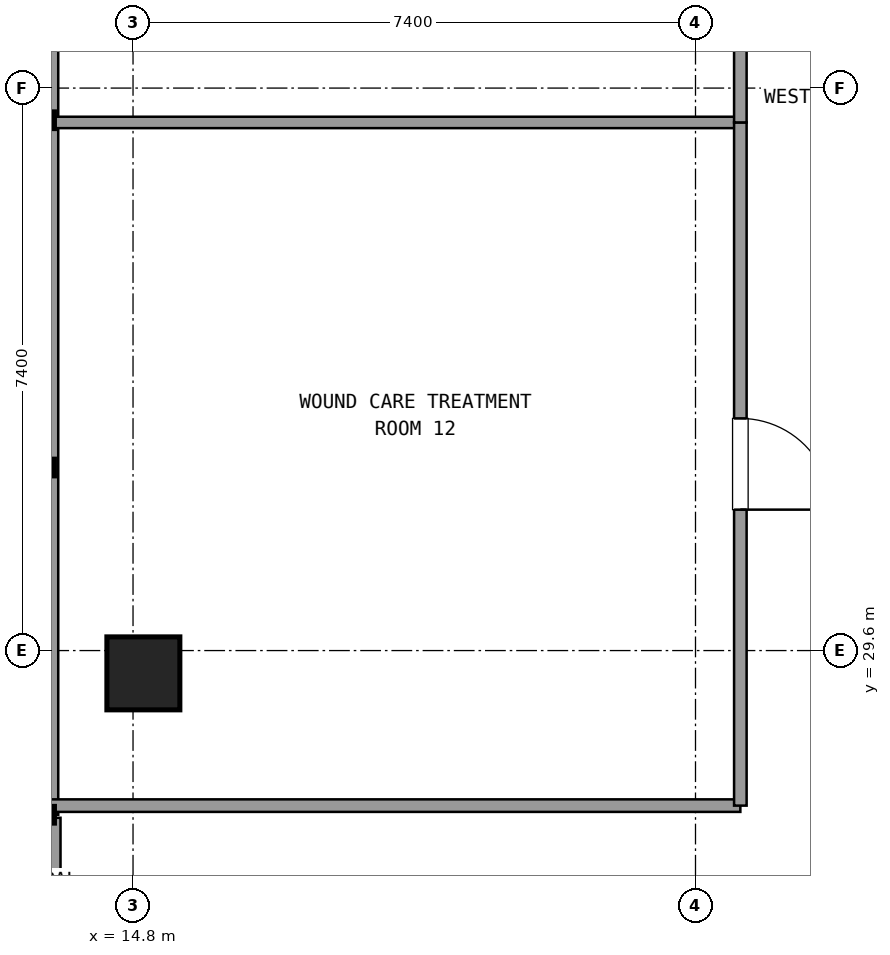
"""IFC4 building model, lengths in metres.
Left out: names, types, materials, properties, quantities, classifications, styles, units other than length and angle.
Written with IfcOpenShell. Run it as: python <this file> out.ifc"""

import sys

from ifc_helpers import new_model, si_unit, direction, frame, frame_2d, origin, origin_2d, place, context, subcontext, project, spatial, rectangle, extrude, element, fill, save


model = new_model("IFC4")
c1 = context("Model", 3, precision=1e-05, world=origin(), true_north=direction((0.0, 1.0)))
c2 = subcontext(c1, "Body", "Model", "MODEL_VIEW")
j1 = project(units=[si_unit("LENGTHUNIT", "METRE"), si_unit("PLANEANGLEUNIT", "RADIAN")], contexts=[c1])
p1 = place(None, origin())
s1 = spatial("IfcSite", under=j1, at=p1, CompositionType="ELEMENT")
p2 = place(p1, origin())
s2 = spatial("IfcBuilding", under=s1, at=p2, CompositionType="ELEMENT")
p3 = place(p2, frame((0.0, 0.0, 142.02)))
s3 = spatial("IfcBuildingStorey", under=s2, at=p3, CompositionType="ELEMENT", Elevation=142.02)
p4 = place(p3, frame((14.936, 29.3, 0.0), z_axis=(0.0, 0.0, 1.0), x_axis=(1.0, 0.0, 0.0)))
e1 = element("IfcColumn", 1, at=p4, inside=s3, PredefinedType="COLUMN", context=c2, shape_type="SweptSolid", body=[
    extrude(rectangle(XDim=0.96, YDim=0.96, at=origin_2d()), origin(), (0.0, 0.0, 1.0), 3.6),
])
p5 = place(p3, frame((13.696, 27.4, 0.0), z_axis=(0.0, 0.0, 1.0), x_axis=(0.0, -1.0, 0.0)))
e2 = element("IfcWall", 2, at=p5, inside=s3, PredefinedType="SOLIDWALL", context=c2, shape_type="SweptSolid", body=[
    extrude(rectangle(XDim=3.0, YDim=0.3, at=frame_2d((1.5, 0.0))), origin(), (0.0, 0.0, 1.0), 2.67),
])
p6 = place(p5, frame((0.9, 0.0, 0.0)))
e3 = element("IfcOpeningElement", 3, at=p6, cuts=e2, PredefinedType="OPENING", context=c2, shape_type="SweptSolid", body=[
    extrude(rectangle(XDim=1.2, YDim=2.2, at=frame_2d((0.6, 1.1))), frame((0.0, 0.16, 0.0), z_axis=(0.0, -1.0, 0.0), x_axis=(1.0, 0.0, 0.0)), (0.0, 0.0, 1.0), 0.32),
])
p7 = place(p3, frame((13.696, 41.145, 0.0), z_axis=(0.0, 0.0, 1.0), x_axis=(0.0, -1.0, 0.0)))
e4 = element("IfcWall", 4, at=p7, inside=s3, PredefinedType="SOLIDWALL", context=c2, shape_type="SweptSolid", body=[
    extrude(rectangle(XDim=13.705, YDim=0.24, at=frame_2d((6.853, 0.0))), origin(), (0.0, 0.0, 1.0), 0.85),
])
p8 = place(p3, frame((13.716, 27.56, 0.0), z_axis=(0.0, 0.0, 1.0), x_axis=(1.0, 0.0, 0.0)))
e5 = element("IfcWall", 5, at=p8, inside=s3, PredefinedType="PARTITIONING", context=c2, shape_type="SweptSolid", body=[
    extrude(rectangle(XDim=9.074, YDim=0.165, at=frame_2d((4.537, 0.0))), origin(), (0.0, 0.0, 1.0), 2.61),
])
p9 = place(p3, frame((22.79, 36.548, 0.0), z_axis=(0.0, 0.0, 1.0), x_axis=(-1.0, 0.0, 0.0)))
e6 = element("IfcWall", 6, at=p9, inside=s3, PredefinedType="PARTITIONING", context=c2, shape_type="SweptSolid", body=[
    extrude(rectangle(XDim=9.074, YDim=0.15, at=frame_2d((4.537, 0.0))), origin(), (0.0, 0.0, 1.0), 2.61),
])
p10 = place(p3, frame((22.79, 27.56, 0.0), z_axis=(0.0, 0.0, 1.0), x_axis=(0.0, 1.0, 0.0)))
e7 = element("IfcWall", 7, at=p10, inside=s3, PredefinedType="PARTITIONING", context=c2, shape_type="SweptSolid", body=[
    extrude(rectangle(XDim=8.988, YDim=0.165, at=frame_2d((4.494, 0.0))), origin(), (0.0, 0.0, 1.0), 2.61),
])
p11 = place(p10, frame((3.894, 0.0, 0.0)))
e8 = element("IfcOpeningElement", 8, at=p11, cuts=e7, PredefinedType="OPENING", context=c2, shape_type="SweptSolid", body=[
    extrude(rectangle(XDim=1.2, YDim=2.15, at=frame_2d((0.6, 1.075))), frame((0.0, 0.093, 0.0), z_axis=(0.0, -1.0, 0.0), x_axis=(1.0, 0.0, 0.0)), (0.0, 0.0, 1.0), 0.185),
])
p12 = place(p3, frame((22.79, 36.548, 0.0), z_axis=(0.0, 0.0, 1.0), x_axis=(0.0, 1.0, 0.0)))
e9 = element("IfcWall", 9, at=p12, inside=s3, PredefinedType="PARTITIONING", context=c2, shape_type="SweptSolid", body=[
    extrude(rectangle(XDim=10.552, YDim=0.165, at=frame_2d((5.276, 0.0))), origin(), (0.0, 0.0, 1.0), 2.61),
])
p13 = place(p12, frame((4.676, 0.0, 0.0)))
e10 = element("IfcOpeningElement", 10, at=p13, cuts=e9, PredefinedType="OPENING", context=c2, shape_type="SweptSolid", body=[
    extrude(rectangle(XDim=1.2, YDim=2.15, at=frame_2d((0.6, 1.075))), frame((0.0, 0.093, 0.0), z_axis=(0.0, -1.0, 0.0), x_axis=(1.0, 0.0, 0.0)), (0.0, 0.0, 1.0), 0.185),
])
p14 = place(p11, frame((1.2, 0.0, 0.0), z_axis=(0.0, 0.0, 1.0), x_axis=(-1.0, 0.0, 0.0)))
e11 = element("IfcDoor", 11, at=p14, inside=s3, OperationType="SINGLE_SWING_LEFT", PredefinedType="DOOR", context=c2, shape_type="SweptSolid", body=[
    extrude(rectangle(XDim=1.2, YDim=2.15, at=frame_2d((0.6, 1.075))), frame((0.0, 0.025, 0.0), z_axis=(0.0, -1.0, 0.0), x_axis=(1.0, 0.0, 0.0)), (0.0, 0.0, 1.0), 0.05),
])
fill(e8, e11)
save(model, sys.argv[1])
